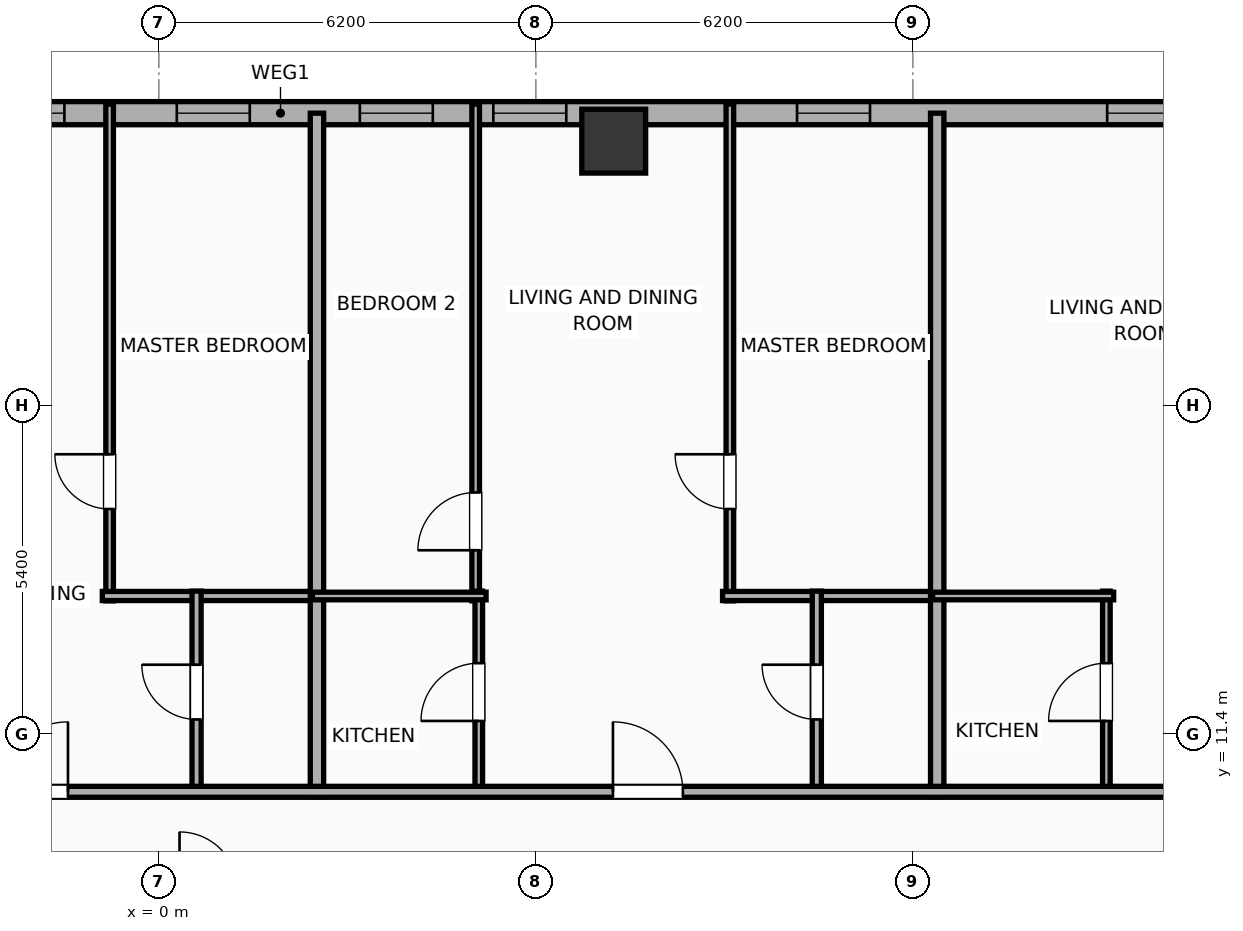
"""IFC4 building model, lengths in metres.
Left out: names, types, materials, properties, quantities, classifications, styles, units other than length and angle.
Written with IfcOpenShell. Run it as: python <this file> out.ifc"""

import sys

from ifc_helpers import new_model, si_unit, direction, frame, frame_2d, origin, origin_2d, place, context, subcontext, project, spatial, rectangle, hollow_rectangle, extrude, element, fill, save


model = new_model("IFC4")
c1 = context("Model", 3, precision=1e-05, world=origin(), true_north=direction((0.0, 1.0)))
c2 = subcontext(c1, "Body", "Model", "MODEL_VIEW")
j1 = project(units=[si_unit("LENGTHUNIT", "METRE"), si_unit("PLANEANGLEUNIT", "RADIAN")], contexts=[c1])
p1 = place(None, origin())
s1 = spatial("IfcSite", under=j1, at=p1, CompositionType="ELEMENT")
p2 = place(p1, origin())
s2 = spatial("IfcBuilding", under=s1, at=p2, CompositionType="ELEMENT")
p3 = place(p2, frame((0.0, 0.0, 93.6)))
s3 = spatial("IfcBuildingStorey", under=s2, at=p3, CompositionType="ELEMENT", Elevation=93.6)
p4 = place(p3, frame((7.48, 21.15, 0.0), z_axis=(0.0, 0.0, 1.0), x_axis=(1.0, 0.0, 0.0)))
e1 = element("IfcColumn", 1, at=p4, inside=s3, PredefinedType="COLUMN", context=c2, shape_type="SweptSolid", body=[
    extrude(hollow_rectangle(XDim=1.05, YDim=1.05, WallThickness=0.036, at=origin_2d()), origin(), (0.0, 0.0, 1.0), 3.9),
])
p5 = place(p3, frame((-25.381, 21.61, 0.0), z_axis=(0.0, 0.0, 1.0), x_axis=(1.0, 0.0, 0.0)))
e2 = element("IfcWall", 2, at=p5, inside=s3, PredefinedType="ELEMENTEDWALL", context=c2, shape_type="SweptSolid", body=[
    extrude(rectangle(XDim=54.763, YDim=0.38, at=frame_2d((27.381, 0.0))), origin(), (0.0, 0.0, 1.0), 3.65),
])
p6 = place(p5, frame((4.795, 0.0, 0.75)))
e3 = element("IfcOpeningElement", 3, at=p6, cuts=e2, PredefinedType="OPENING", context=c2, shape_type="SweptSolid", body=[
    extrude(rectangle(XDim=2.4, YDim=2.1, at=frame_2d((1.2, 1.05))), frame((0.0, 0.2, 0.0), z_axis=(0.0, -1.0, 0.0), x_axis=(1.0, 0.0, 0.0)), (0.0, 0.0, 1.0), 0.4),
])
p7 = place(p5, frame((2.377, 0.0, 0.75)))
e4 = element("IfcOpeningElement", 4, at=p7, cuts=e2, PredefinedType="OPENING", context=c2, shape_type="SweptSolid", body=[
    extrude(rectangle(XDim=1.2, YDim=2.05, at=frame_2d((0.6, 1.025))), frame((0.0, 0.2, 0.0), z_axis=(0.0, -1.0, 0.0), x_axis=(1.0, 0.0, 0.0)), (0.0, 0.0, 1.0), 0.4),
])
p8 = place(p5, frame((11.707, 0.0, 0.75)))
e5 = element("IfcOpeningElement", 5, at=p8, cuts=e2, PredefinedType="OPENING", context=c2, shape_type="SweptSolid", body=[
    extrude(rectangle(XDim=1.2, YDim=2.05, at=frame_2d((0.6, 1.025))), frame((0.0, 0.2, 0.0), z_axis=(0.0, -1.0, 0.0), x_axis=(1.0, 0.0, 0.0)), (0.0, 0.0, 1.0), 0.4),
])
p9 = place(p5, frame((8.312, 0.0, 0.75)))
e6 = element("IfcOpeningElement", 6, at=p9, cuts=e2, PredefinedType="OPENING", context=c2, shape_type="SweptSolid", body=[
    extrude(rectangle(XDim=1.2, YDim=2.05, at=frame_2d((0.6, 1.025))), frame((0.0, 0.2, 0.0), z_axis=(0.0, -1.0, 0.0), x_axis=(1.0, 0.0, 0.0)), (0.0, 0.0, 1.0), 0.4),
])
p10 = place(p5, frame((15.476, 0.0, 0.75)))
e7 = element("IfcOpeningElement", 7, at=p10, cuts=e2, PredefinedType="OPENING", context=c2, shape_type="SweptSolid", body=[
    extrude(rectangle(XDim=1.2, YDim=2.05, at=frame_2d((0.6, 1.025))), frame((0.0, 0.2, 0.0), z_axis=(0.0, -1.0, 0.0), x_axis=(1.0, 0.0, 0.0)), (0.0, 0.0, 1.0), 0.4),
])
p11 = place(p5, frame((22.628, 0.0, 0.75)))
e8 = element("IfcOpeningElement", 8, at=p11, cuts=e2, PredefinedType="OPENING", context=c2, shape_type="SweptSolid", body=[
    extrude(rectangle(XDim=1.2, YDim=2.05, at=frame_2d((0.6, 1.025))), frame((0.0, 0.2, 0.0), z_axis=(0.0, -1.0, 0.0), x_axis=(1.0, 0.0, 0.0)), (0.0, 0.0, 1.0), 0.4),
])
p12 = place(p5, frame((18.633, 0.0, 0.75)))
e9 = element("IfcOpeningElement", 9, at=p12, cuts=e2, PredefinedType="OPENING", context=c2, shape_type="SweptSolid", body=[
    extrude(rectangle(XDim=1.2, YDim=2.05, at=frame_2d((0.6, 1.025))), frame((0.0, 0.2, 0.0), z_axis=(0.0, -1.0, 0.0), x_axis=(1.0, 0.0, 0.0)), (0.0, 0.0, 1.0), 0.4),
])
p13 = place(p5, frame((25.676, 0.0, 0.75)))
e10 = element("IfcOpeningElement", 10, at=p13, cuts=e2, PredefinedType="OPENING", context=c2, shape_type="SweptSolid", body=[
    extrude(rectangle(XDim=1.2, YDim=2.05, at=frame_2d((0.6, 1.025))), frame((0.0, 0.2, 0.0), z_axis=(0.0, -1.0, 0.0), x_axis=(1.0, 0.0, 0.0)), (0.0, 0.0, 1.0), 0.4),
])
p14 = place(p5, frame((30.881, 0.0, 0.75)))
e11 = element("IfcOpeningElement", 11, at=p14, cuts=e2, PredefinedType="OPENING", context=c2, shape_type="SweptSolid", body=[
    extrude(rectangle(XDim=1.2, YDim=2.05, at=frame_2d((0.6, 1.025))), frame((0.0, 0.2, 0.0), z_axis=(0.0, -1.0, 0.0), x_axis=(1.0, 0.0, 0.0)), (0.0, 0.0, 1.0), 0.4),
])
p15 = place(p5, frame((28.686, 0.0, 0.75)))
e12 = element("IfcOpeningElement", 12, at=p15, cuts=e2, PredefinedType="OPENING", context=c2, shape_type="SweptSolid", body=[
    extrude(rectangle(XDim=1.2, YDim=2.05, at=frame_2d((0.6, 1.025))), frame((0.0, 0.2, 0.0), z_axis=(0.0, -1.0, 0.0), x_axis=(1.0, 0.0, 0.0)), (0.0, 0.0, 1.0), 0.4),
])
p16 = place(p5, frame((35.876, 0.0, 0.75)))
e13 = element("IfcOpeningElement", 13, at=p16, cuts=e2, PredefinedType="OPENING", context=c2, shape_type="SweptSolid", body=[
    extrude(rectangle(XDim=1.2, YDim=2.05, at=frame_2d((0.6, 1.025))), frame((0.0, 0.2, 0.0), z_axis=(0.0, -1.0, 0.0), x_axis=(1.0, 0.0, 0.0)), (0.0, 0.0, 1.0), 0.4),
])
p17 = place(p5, frame((40.976, 0.0, 0.75)))
e14 = element("IfcOpeningElement", 14, at=p17, cuts=e2, PredefinedType="OPENING", context=c2, shape_type="SweptSolid", body=[
    extrude(rectangle(XDim=1.2, YDim=2.05, at=frame_2d((0.6, 1.025))), frame((0.0, 0.2, 0.0), z_axis=(0.0, -1.0, 0.0), x_axis=(1.0, 0.0, 0.0)), (0.0, 0.0, 1.0), 0.4),
])
p18 = place(p5, frame((46.076, 0.0, 0.75)))
e15 = element("IfcOpeningElement", 15, at=p18, cuts=e2, PredefinedType="OPENING", context=c2, shape_type="SweptSolid", body=[
    extrude(rectangle(XDim=1.2, YDim=2.05, at=frame_2d((0.6, 1.025))), frame((0.0, 0.2, 0.0), z_axis=(0.0, -1.0, 0.0), x_axis=(1.0, 0.0, 0.0)), (0.0, 0.0, 1.0), 0.4),
])
p19 = place(p5, frame((50.527, 0.0, 0.75)))
e16 = element("IfcOpeningElement", 16, at=p19, cuts=e2, PredefinedType="OPENING", context=c2, shape_type="SweptSolid", body=[
    extrude(rectangle(XDim=1.2, YDim=2.05, at=frame_2d((0.6, 1.025))), frame((0.0, 0.2, 0.0), z_axis=(0.0, -1.0, 0.0), x_axis=(1.0, 0.0, 0.0)), (0.0, 0.0, 1.0), 0.4),
])
p20 = place(p3, frame((-0.81, 13.59, 0.0), z_axis=(0.0, 0.0, 1.0), x_axis=(0.0, 1.0, 0.0)))
e17 = element("IfcWall", 17, at=p20, inside=s3, PredefinedType="PARTITIONING", context=c2, shape_type="SweptSolid", body=[
    extrude(rectangle(XDim=8.17, YDim=0.125, at=frame_2d((4.085, 0.0))), origin(), (0.0, 0.0, 1.0), 3.65),
])
p21 = place(p20, frame((1.511, 0.0, 0.0)))
e18 = element("IfcOpeningElement", 18, at=p21, cuts=e17, PredefinedType="OPENING", context=c2, shape_type="SweptSolid", body=[
    extrude(rectangle(XDim=0.9, YDim=2.05, at=frame_2d((0.45, 1.025))), frame((0.0, 0.073, 0.0), z_axis=(0.0, -1.0, 0.0), x_axis=(1.0, 0.0, 0.0)), (0.0, 0.0, 1.0), 0.145),
])
p22 = place(p3, frame((-0.93, 13.67, 0.0), z_axis=(0.0, 0.0, 1.0), x_axis=(1.0, 0.0, 0.0)))
e19 = element("IfcWall", 19, at=p22, inside=s3, PredefinedType="PLUMBINGWALL", context=c2, shape_type="SweptSolid", body=[
    extrude(rectangle(XDim=3.605, YDim=0.15, at=frame_2d((1.802, 0.0))), origin(), (0.0, 0.0, 1.0), 3.65),
])
p23 = place(p3, frame((0.62, 10.43, 0.0), z_axis=(0.0, 0.0, 1.0), x_axis=(0.0, 1.0, 0.0)))
e20 = element("IfcWall", 20, at=p23, inside=s3, PredefinedType="PLUMBINGWALL", context=c2, shape_type="SweptSolid", body=[
    extrude(rectangle(XDim=3.32, YDim=0.15, at=frame_2d((1.66, 0.0))), origin(), (0.0, 0.0, 1.0), 3.65),
])
p24 = place(p23, frame((1.21, 0.0, 0.0)))
e21 = element("IfcOpeningElement", 21, at=p24, cuts=e20, PredefinedType="OPENING", context=c2, shape_type="SweptSolid", body=[
    extrude(rectangle(XDim=0.9, YDim=2.05, at=frame_2d((0.45, 1.025))), frame((0.0, 0.085, 0.0), z_axis=(0.0, -1.0, 0.0), x_axis=(1.0, 0.0, 0.0)), (0.0, 0.0, 1.0), 0.17),
])
p25 = place(p3, frame((2.6, 10.37, 0.0), z_axis=(0.0, 0.0, 1.0), x_axis=(0.0, 1.0, 0.0)))
e22 = element("IfcWall", 22, at=p25, inside=s3, PredefinedType="PARTITIONING", context=c2, shape_type="SweptSolid", body=[
    extrude(rectangle(XDim=11.24, YDim=0.22, at=frame_2d((5.62, 0.0))), origin(), (0.0, 0.0, 1.0), 3.65),
])
p26 = place(p3, frame((5.21, 13.59, 0.0), z_axis=(0.0, 0.0, 1.0), x_axis=(0.0, 1.0, 0.0)))
e23 = element("IfcWall", 23, at=p26, inside=s3, PredefinedType="PARTITIONING", context=c2, shape_type="SweptSolid", body=[
    extrude(rectangle(XDim=8.17, YDim=0.125, at=frame_2d((4.085, 0.0))), origin(), (0.0, 0.0, 1.0), 3.65),
])
p27 = place(p26, frame((0.832, 0.0, 0.0)))
e24 = element("IfcOpeningElement", 24, at=p27, cuts=e23, PredefinedType="OPENING", context=c2, shape_type="SweptSolid", body=[
    extrude(rectangle(XDim=0.95, YDim=2.05, at=frame_2d((0.475, 1.025))), frame((0.0, 0.073, 0.0), z_axis=(0.0, -1.0, 0.0), x_axis=(1.0, 0.0, 0.0)), (0.0, 0.0, 1.0), 0.145),
])
p28 = place(p3, frame((9.39, 13.59, 0.0), z_axis=(0.0, 0.0, 1.0), x_axis=(0.0, 1.0, 0.0)))
e25 = element("IfcWall", 25, at=p28, inside=s3, PredefinedType="PARTITIONING", context=c2, shape_type="SweptSolid", body=[
    extrude(rectangle(XDim=8.17, YDim=0.125, at=frame_2d((4.085, 0.0))), origin(), (0.0, 0.0, 1.0), 3.65),
])
p29 = place(p28, frame((1.511, 0.0, 0.0)))
e26 = element("IfcOpeningElement", 26, at=p29, cuts=e25, PredefinedType="OPENING", context=c2, shape_type="SweptSolid", body=[
    extrude(rectangle(XDim=0.9, YDim=2.05, at=frame_2d((0.45, 1.025))), frame((0.0, 0.073, 0.0), z_axis=(0.0, -1.0, 0.0), x_axis=(1.0, 0.0, 0.0)), (0.0, 0.0, 1.0), 0.145),
])
p30 = place(p3, frame((9.27, 13.67, 0.0), z_axis=(0.0, 0.0, 1.0), x_axis=(1.0, 0.0, 0.0)))
e27 = element("IfcWall", 27, at=p30, inside=s3, PredefinedType="PLUMBINGWALL", context=c2, shape_type="SweptSolid", body=[
    extrude(rectangle(XDim=3.605, YDim=0.15, at=frame_2d((1.802, 0.0))), origin(), (0.0, 0.0, 1.0), 3.65),
])
p31 = place(p3, frame((5.261, 10.43, 0.0), z_axis=(0.0, 0.0, 1.0), x_axis=(0.0, 1.0, 0.0)))
e28 = element("IfcWall", 28, at=p31, inside=s3, PredefinedType="PARTITIONING", context=c2, shape_type="SweptSolid", body=[
    extrude(rectangle(XDim=3.32, YDim=0.125, at=frame_2d((1.66, 0.0))), origin(), (0.0, 0.0, 1.0), 3.04),
])
p32 = place(p31, frame((1.185, 0.0, 0.0)))
e29 = element("IfcOpeningElement", 29, at=p32, cuts=e28, PredefinedType="OPENING", context=c2, shape_type="SweptSolid", body=[
    extrude(rectangle(XDim=0.95, YDim=2.05, at=frame_2d((0.475, 1.025))), frame((0.0, 0.073, 0.0), z_axis=(0.0, -1.0, 0.0), x_axis=(1.0, 0.0, 0.0)), (0.0, 0.0, 1.0), 0.145),
])
p33 = place(p3, frame((2.525, 13.67, 0.0), z_axis=(0.0, 0.0, 1.0), x_axis=(1.0, 0.0, 0.0)))
e30 = element("IfcWall", 30, at=p33, inside=s3, PredefinedType="PARTITIONING", context=c2, shape_type="SweptSolid", body=[
    extrude(rectangle(XDim=2.856, YDim=0.125, at=frame_2d((1.428, 0.0))), origin(), (0.0, 0.0, 1.0), 3.65),
])
p34 = place(p3, frame((10.82, 10.43, 0.0), z_axis=(0.0, 0.0, 1.0), x_axis=(0.0, 1.0, 0.0)))
e31 = element("IfcWall", 31, at=p34, inside=s3, PredefinedType="PLUMBINGWALL", context=c2, shape_type="SweptSolid", body=[
    extrude(rectangle(XDim=3.32, YDim=0.15, at=frame_2d((1.66, 0.0))), origin(), (0.0, 0.0, 1.0), 3.65),
])
p35 = place(p34, frame((1.21, 0.0, 0.0)))
e32 = element("IfcOpeningElement", 32, at=p35, cuts=e31, PredefinedType="OPENING", context=c2, shape_type="SweptSolid", body=[
    extrude(rectangle(XDim=0.9, YDim=2.05, at=frame_2d((0.45, 1.025))), frame((0.0, 0.085, 0.0), z_axis=(0.0, -1.0, 0.0), x_axis=(1.0, 0.0, 0.0)), (0.0, 0.0, 1.0), 0.17),
])
p36 = place(p3, frame((12.8, 10.37, 0.0), z_axis=(0.0, 0.0, 1.0), x_axis=(0.0, 1.0, 0.0)))
e33 = element("IfcWall", 33, at=p36, inside=s3, PredefinedType="PARTITIONING", context=c2, shape_type="SweptSolid", body=[
    extrude(rectangle(XDim=11.24, YDim=0.22, at=frame_2d((5.62, 0.0))), origin(), (0.0, 0.0, 1.0), 3.65),
])
p37 = place(p3, frame((15.582, 10.43, 0.0), z_axis=(0.0, 0.0, 1.0), x_axis=(0.0, 1.0, 0.0)))
e34 = element("IfcWall", 34, at=p37, inside=s3, PredefinedType="PARTITIONING", context=c2, shape_type="SweptSolid", body=[
    extrude(rectangle(XDim=3.32, YDim=0.125, at=frame_2d((1.66, 0.0))), origin(), (0.0, 0.0, 1.0), 3.65),
])
p38 = place(p37, frame((1.185, 0.0, 0.0)))
e35 = element("IfcOpeningElement", 35, at=p38, cuts=e34, PredefinedType="OPENING", context=c2, shape_type="SweptSolid", body=[
    extrude(rectangle(XDim=0.95, YDim=2.05, at=frame_2d((0.475, 1.025))), frame((0.0, 0.073, 0.0), z_axis=(0.0, -1.0, 0.0), x_axis=(1.0, 0.0, 0.0)), (0.0, 0.0, 1.0), 0.145),
])
p39 = place(p3, frame((12.725, 13.67, 0.0), z_axis=(0.0, 0.0, 1.0), x_axis=(1.0, 0.0, 0.0)))
e36 = element("IfcWall", 36, at=p39, inside=s3, PredefinedType="PARTITIONING", context=c2, shape_type="SweptSolid", body=[
    extrude(rectangle(XDim=2.977, YDim=0.125, at=frame_2d((1.488, 0.0))), origin(), (0.0, 0.0, 1.0), 3.65),
])
p40 = place(p3, frame((-29.21, 10.45, 0.0), z_axis=(0.0, 0.0, 1.0), x_axis=(1.0, 0.0, 0.0)))
e37 = element("IfcWall", 37, at=p40, inside=s3, PredefinedType="PARTITIONING", context=c2, shape_type="SweptSolid", body=[
    extrude(rectangle(XDim=62.42, YDim=0.18, at=frame_2d((31.21, 0.0))), origin(), (0.0, 0.0, 1.0), 3.65),
])
p41 = place(p40, frame((2.534, 0.0, 0.0)))
e38 = element("IfcOpeningElement", 38, at=p41, cuts=e37, PredefinedType="OPENING", context=c2, shape_type="SweptSolid", body=[
    extrude(rectangle(XDim=0.9, YDim=2.05, at=frame_2d((0.45, 1.025))), frame((0.0, 0.1, 0.0), z_axis=(0.0, -1.0, 0.0), x_axis=(1.0, 0.0, 0.0)), (0.0, 0.0, 1.0), 0.2),
])
p42 = place(p40, frame((9.056, 0.0, 0.0)))
e39 = element("IfcOpeningElement", 39, at=p42, cuts=e37, PredefinedType="OPENING", context=c2, shape_type="SweptSolid", body=[
    extrude(rectangle(XDim=1.15, YDim=2.05, at=frame_2d((0.575, 1.025))), frame((0.0, 0.1, 0.0), z_axis=(0.0, -1.0, 0.0), x_axis=(1.0, 0.0, 0.0)), (0.0, 0.0, 1.0), 0.2),
])
p43 = place(p40, frame((16.303, 0.0, 0.0)))
e40 = element("IfcOpeningElement", 40, at=p43, cuts=e37, PredefinedType="OPENING", context=c2, shape_type="SweptSolid", body=[
    extrude(rectangle(XDim=1.15, YDim=2.05, at=frame_2d((0.575, 1.025))), frame((0.0, 0.1, 0.0), z_axis=(0.0, -1.0, 0.0), x_axis=(1.0, 0.0, 0.0)), (0.0, 0.0, 1.0), 0.2),
])
p44 = place(p40, frame((26.565, 0.0, 0.0)))
e41 = element("IfcOpeningElement", 41, at=p44, cuts=e37, PredefinedType="OPENING", context=c2, shape_type="SweptSolid", body=[
    extrude(rectangle(XDim=1.15, YDim=2.05, at=frame_2d((0.575, 1.025))), frame((0.0, 0.1, 0.0), z_axis=(0.0, -1.0, 0.0), x_axis=(1.0, 0.0, 0.0)), (0.0, 0.0, 1.0), 0.2),
])
p45 = place(p40, frame((36.677, 0.0, 0.0)))
e42 = element("IfcOpeningElement", 42, at=p45, cuts=e37, PredefinedType="OPENING", context=c2, shape_type="SweptSolid", body=[
    extrude(rectangle(XDim=1.15, YDim=2.05, at=frame_2d((0.575, 1.025))), frame((0.0, 0.1, 0.0), z_axis=(0.0, -1.0, 0.0), x_axis=(1.0, 0.0, 0.0)), (0.0, 0.0, 1.0), 0.2),
])
p46 = place(p40, frame((46.939, 0.0, 0.0)))
e43 = element("IfcOpeningElement", 43, at=p46, cuts=e37, PredefinedType="OPENING", context=c2, shape_type="SweptSolid", body=[
    extrude(rectangle(XDim=1.15, YDim=2.05, at=frame_2d((0.575, 1.025))), frame((0.0, 0.1, 0.0), z_axis=(0.0, -1.0, 0.0), x_axis=(1.0, 0.0, 0.0)), (0.0, 0.0, 1.0), 0.2),
])
p47 = place(p40, frame((57.245, 0.0, 0.0)))
e44 = element("IfcOpeningElement", 44, at=p47, cuts=e37, PredefinedType="OPENING", context=c2, shape_type="SweptSolid", body=[
    extrude(rectangle(XDim=1.15, YDim=2.05, at=frame_2d((0.575, 1.025))), frame((0.0, 0.1, 0.0), z_axis=(0.0, -1.0, 0.0), x_axis=(1.0, 0.0, 0.0)), (0.0, 0.0, 1.0), 0.2),
])
p48 = place(p11, origin())
e45 = element("IfcWindow", 45, at=p48, inside=s3, PartitioningType="SINGLE_PANEL", PredefinedType="WINDOW", context=c2, shape_type="SweptSolid", body=[
    extrude(rectangle(XDim=1.2, YDim=2.05, at=frame_2d((0.6, 1.025))), frame((0.0, 0.03, 0.0), z_axis=(0.0, -1.0, 0.0), x_axis=(1.0, 0.0, 0.0)), (0.0, 0.0, 1.0), 0.06),
])
fill(e8, e45)
p49 = place(p13, origin())
e46 = element("IfcWindow", 46, at=p49, inside=s3, PartitioningType="SINGLE_PANEL", PredefinedType="WINDOW", context=c2, shape_type="SweptSolid", body=[
    extrude(rectangle(XDim=1.2, YDim=2.05, at=frame_2d((0.6, 1.025))), frame((0.0, 0.03, 0.0), z_axis=(0.0, -1.0, 0.0), x_axis=(1.0, 0.0, 0.0)), (0.0, 0.0, 1.0), 0.06),
])
fill(e10, e46)
p50 = place(p14, origin())
e47 = element("IfcWindow", 47, at=p50, inside=s3, PartitioningType="SINGLE_PANEL", PredefinedType="WINDOW", context=c2, shape_type="SweptSolid", body=[
    extrude(rectangle(XDim=1.2, YDim=2.05, at=frame_2d((0.6, 1.025))), frame((0.0, 0.03, 0.0), z_axis=(0.0, -1.0, 0.0), x_axis=(1.0, 0.0, 0.0)), (0.0, 0.0, 1.0), 0.06),
])
fill(e11, e47)
p51 = place(p15, origin())
e48 = element("IfcWindow", 48, at=p51, inside=s3, PartitioningType="SINGLE_PANEL", PredefinedType="WINDOW", context=c2, shape_type="SweptSolid", body=[
    extrude(rectangle(XDim=1.2, YDim=2.05, at=frame_2d((0.6, 1.025))), frame((0.0, 0.03, 0.0), z_axis=(0.0, -1.0, 0.0), x_axis=(1.0, 0.0, 0.0)), (0.0, 0.0, 1.0), 0.06),
])
fill(e12, e48)
p52 = place(p16, origin())
e49 = element("IfcWindow", 49, at=p52, inside=s3, PartitioningType="SINGLE_PANEL", PredefinedType="WINDOW", context=c2, shape_type="SweptSolid", body=[
    extrude(rectangle(XDim=1.2, YDim=2.05, at=frame_2d((0.6, 1.025))), frame((0.0, 0.03, 0.0), z_axis=(0.0, -1.0, 0.0), x_axis=(1.0, 0.0, 0.0)), (0.0, 0.0, 1.0), 0.06),
])
fill(e13, e49)
p53 = place(p17, origin())
e50 = element("IfcWindow", 50, at=p53, inside=s3, PartitioningType="SINGLE_PANEL", PredefinedType="WINDOW", context=c2, shape_type="SweptSolid", body=[
    extrude(rectangle(XDim=1.2, YDim=2.05, at=frame_2d((0.6, 1.025))), frame((0.0, 0.03, 0.0), z_axis=(0.0, -1.0, 0.0), x_axis=(1.0, 0.0, 0.0)), (0.0, 0.0, 1.0), 0.06),
])
fill(e14, e50)
p54 = place(p21, origin())
e51 = element("IfcDoor", 51, at=p54, inside=s3, OperationType="SINGLE_SWING_RIGHT", PredefinedType="DOOR", context=c2, shape_type="SweptSolid", body=[
    extrude(rectangle(XDim=0.9, YDim=2.05, at=frame_2d((0.45, 1.025))), frame((0.0, 0.025, 0.0), z_axis=(0.0, -1.0, 0.0), x_axis=(1.0, 0.0, 0.0)), (0.0, 0.0, 1.0), 0.05),
])
fill(e18, e51)
p55 = place(p24, origin())
e52 = element("IfcDoor", 52, at=p55, inside=s3, OperationType="SINGLE_SWING_RIGHT", PredefinedType="DOOR", context=c2, shape_type="SweptSolid", body=[
    extrude(rectangle(XDim=0.9, YDim=2.05, at=frame_2d((0.45, 1.025))), frame((0.0, 0.025, 0.0), z_axis=(0.0, -1.0, 0.0), x_axis=(1.0, 0.0, 0.0)), (0.0, 0.0, 1.0), 0.05),
])
fill(e21, e52)
p56 = place(p27, origin())
e53 = element("IfcDoor", 53, at=p56, inside=s3, OperationType="SINGLE_SWING_LEFT", PredefinedType="DOOR", context=c2, shape_type="SweptSolid", body=[
    extrude(rectangle(XDim=0.95, YDim=2.05, at=frame_2d((0.475, 1.025))), frame((0.0, 0.025, 0.0), z_axis=(0.0, -1.0, 0.0), x_axis=(1.0, 0.0, 0.0)), (0.0, 0.0, 1.0), 0.05),
])
fill(e24, e53)
p57 = place(p29, origin())
e54 = element("IfcDoor", 54, at=p57, inside=s3, OperationType="SINGLE_SWING_RIGHT", PredefinedType="DOOR", context=c2, shape_type="SweptSolid", body=[
    extrude(rectangle(XDim=0.9, YDim=2.05, at=frame_2d((0.45, 1.025))), frame((0.0, 0.025, 0.0), z_axis=(0.0, -1.0, 0.0), x_axis=(1.0, 0.0, 0.0)), (0.0, 0.0, 1.0), 0.05),
])
fill(e26, e54)
p58 = place(p32, origin())
e55 = element("IfcDoor", 55, at=p58, inside=s3, OperationType="SINGLE_SWING_LEFT", PredefinedType="DOOR", context=c2, shape_type="SweptSolid", body=[
    extrude(rectangle(XDim=0.95, YDim=2.05, at=frame_2d((0.475, 1.025))), frame((0.0, 0.025, 0.0), z_axis=(0.0, -1.0, 0.0), x_axis=(1.0, 0.0, 0.0)), (0.0, 0.0, 1.0), 0.05),
])
fill(e29, e55)
p59 = place(p35, origin())
e56 = element("IfcDoor", 56, at=p59, inside=s3, OperationType="SINGLE_SWING_RIGHT", PredefinedType="DOOR", context=c2, shape_type="SweptSolid", body=[
    extrude(rectangle(XDim=0.9, YDim=2.05, at=frame_2d((0.45, 1.025))), frame((0.0, 0.025, 0.0), z_axis=(0.0, -1.0, 0.0), x_axis=(1.0, 0.0, 0.0)), (0.0, 0.0, 1.0), 0.05),
])
fill(e32, e56)
p60 = place(p38, origin())
e57 = element("IfcDoor", 57, at=p60, inside=s3, OperationType="SINGLE_SWING_LEFT", PredefinedType="DOOR", context=c2, shape_type="SweptSolid", body=[
    extrude(rectangle(XDim=0.95, YDim=2.05, at=frame_2d((0.475, 1.025))), frame((0.0, 0.025, 0.0), z_axis=(0.0, -1.0, 0.0), x_axis=(1.0, 0.0, 0.0)), (0.0, 0.0, 1.0), 0.05),
])
fill(e35, e57)
p61 = place(p44, origin())
e58 = element("IfcDoor", 58, at=p61, inside=s3, OperationType="SINGLE_SWING_RIGHT", PredefinedType="DOOR", context=c2, shape_type="SweptSolid", body=[
    extrude(rectangle(XDim=1.15, YDim=2.05, at=frame_2d((0.575, 1.025))), frame((0.0, 0.025, 0.0), z_axis=(0.0, -1.0, 0.0), x_axis=(1.0, 0.0, 0.0)), (0.0, 0.0, 1.0), 0.05),
])
fill(e41, e58)
p62 = place(p45, origin())
e59 = element("IfcDoor", 59, at=p62, inside=s3, OperationType="SINGLE_SWING_LEFT", PredefinedType="DOOR", context=c2, shape_type="SweptSolid", body=[
    extrude(rectangle(XDim=1.15, YDim=2.05, at=frame_2d((0.575, 1.025))), frame((0.0, 0.025, 0.0), z_axis=(0.0, -1.0, 0.0), x_axis=(1.0, 0.0, 0.0)), (0.0, 0.0, 1.0), 0.05),
])
fill(e42, e59)
save(model, sys.argv[1])
